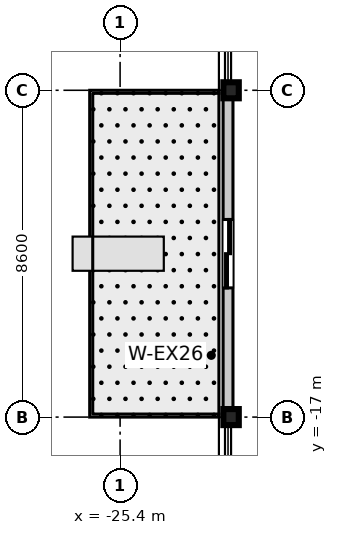
"""IFC4 building model, lengths in metres.
Left out: names, types, materials, properties, quantities, classifications, styles, units other than length and angle.
Written with IfcOpenShell. Run it as: python <this file> out.ifc"""

import sys

from ifc_helpers import new_model, si_unit, direction, frame, frame_2d, origin, origin_2d, place, context, subcontext, project, spatial, rectangle, i_section, extrude, source, transform, mapped, element, fill, save


model = new_model("IFC4")
c1 = context("Model", 3, precision=1e-05, world=origin(), true_north=direction((0.0, 1.0)))
c2 = subcontext(c1, "Body", "Model", "MODEL_VIEW")
j1 = project(units=[si_unit("LENGTHUNIT", "METRE"), si_unit("PLANEANGLEUNIT", "RADIAN")], contexts=[c1])
p1 = place(None, origin())
s1 = spatial("IfcSite", under=j1, at=p1, CompositionType="ELEMENT")
p2 = place(p1, origin())
s2 = spatial("IfcBuilding", under=s1, at=p2, CompositionType="ELEMENT")
p3 = place(p2, frame((0.0, 0.0, 170.9)))
s3 = spatial("IfcBuildingStorey", under=s2, at=p3, CompositionType="ELEMENT", Elevation=170.9)
m1 = source(origin(), c2, "Body", "SweptSolid", [
    extrude(i_section(OverallWidth=0.406, OverallDepth=0.422, WebThickness=0.019, FlangeThickness=0.03, at=origin_2d()), origin(), (0.0, 0.0, 1.0), 3.605),
])
for number, where, z_axis, x_axis in (
    (1, (-22.48, -17.0, 0.0), (0.0, 0.0, 1.0), (1.0, 0.0, 0.0)),
    (2, (-22.48, -8.4, 0.0), (0.0, 0.0, 1.0), (1.0, 0.0, 0.0)),
):
    element("IfcColumn", number, at=place(p3, frame(where, z_axis=z_axis, x_axis=x_axis)), inside=s3, PredefinedType="COLUMN", context=c2, shape_type="MappedRepresentation", body=[
        mapped(m1, transform((0.0, 0.0, 0.0), scale=1.0)),
    ])
m2 = source(origin(), c2, "Body", "SweptSolid", [
    extrude(rectangle(XDim=8.6, YDim=0.26, at=frame_2d((4.3, 0.0))), origin(), (0.0, 0.0, 1.0), 2.87),
])
p4 = place(p3, frame((-22.56, -17.0, 0.0), z_axis=(0.0, 0.0, 1.0), x_axis=(0.0, 1.0, 0.0)))
e3 = element("IfcWall", 3, at=p4, inside=s3, PredefinedType="STANDARD", context=c2, shape_type="MappedRepresentation", body=[
    mapped(m2, transform((0.0, 0.0, 0.0), scale=1.0)),
])
p5 = place(p4, frame((3.4, 0.0, 0.0)))
e4 = element("IfcOpeningElement", 4, at=p5, cuts=e3, PredefinedType="OPENING", context=c2, shape_type="SweptSolid", body=[
    extrude(rectangle(XDim=1.8, YDim=2.25, at=frame_2d((0.9, 1.125))), frame((0.0, 0.14, 0.0), z_axis=(0.0, -1.0, 0.0), x_axis=(1.0, 0.0, 0.0)), (0.0, 0.0, 1.0), 0.28),
])
m3 = source(origin(), c2, "Body", "SweptSolid", [
    extrude(rectangle(XDim=1.8, YDim=2.25, at=frame_2d((0.9, 1.125))), frame((0.0, 0.025, 0.0), z_axis=(0.0, -1.0, 0.0), x_axis=(1.0, 0.0, 0.0)), (0.0, 0.0, 1.0), 0.05),
])
p6 = place(p5, origin())
e5 = element("IfcDoor", 5, at=p6, inside=s3, OperationType="DOUBLE_DOOR_SLIDING", PredefinedType="DOOR", context=c2, shape_type="MappedRepresentation", body=[
    mapped(m3, transform((0.0, 0.0, 0.0), scale=1.0)),
])
fill(e4, e5)
save(model, sys.argv[1])
